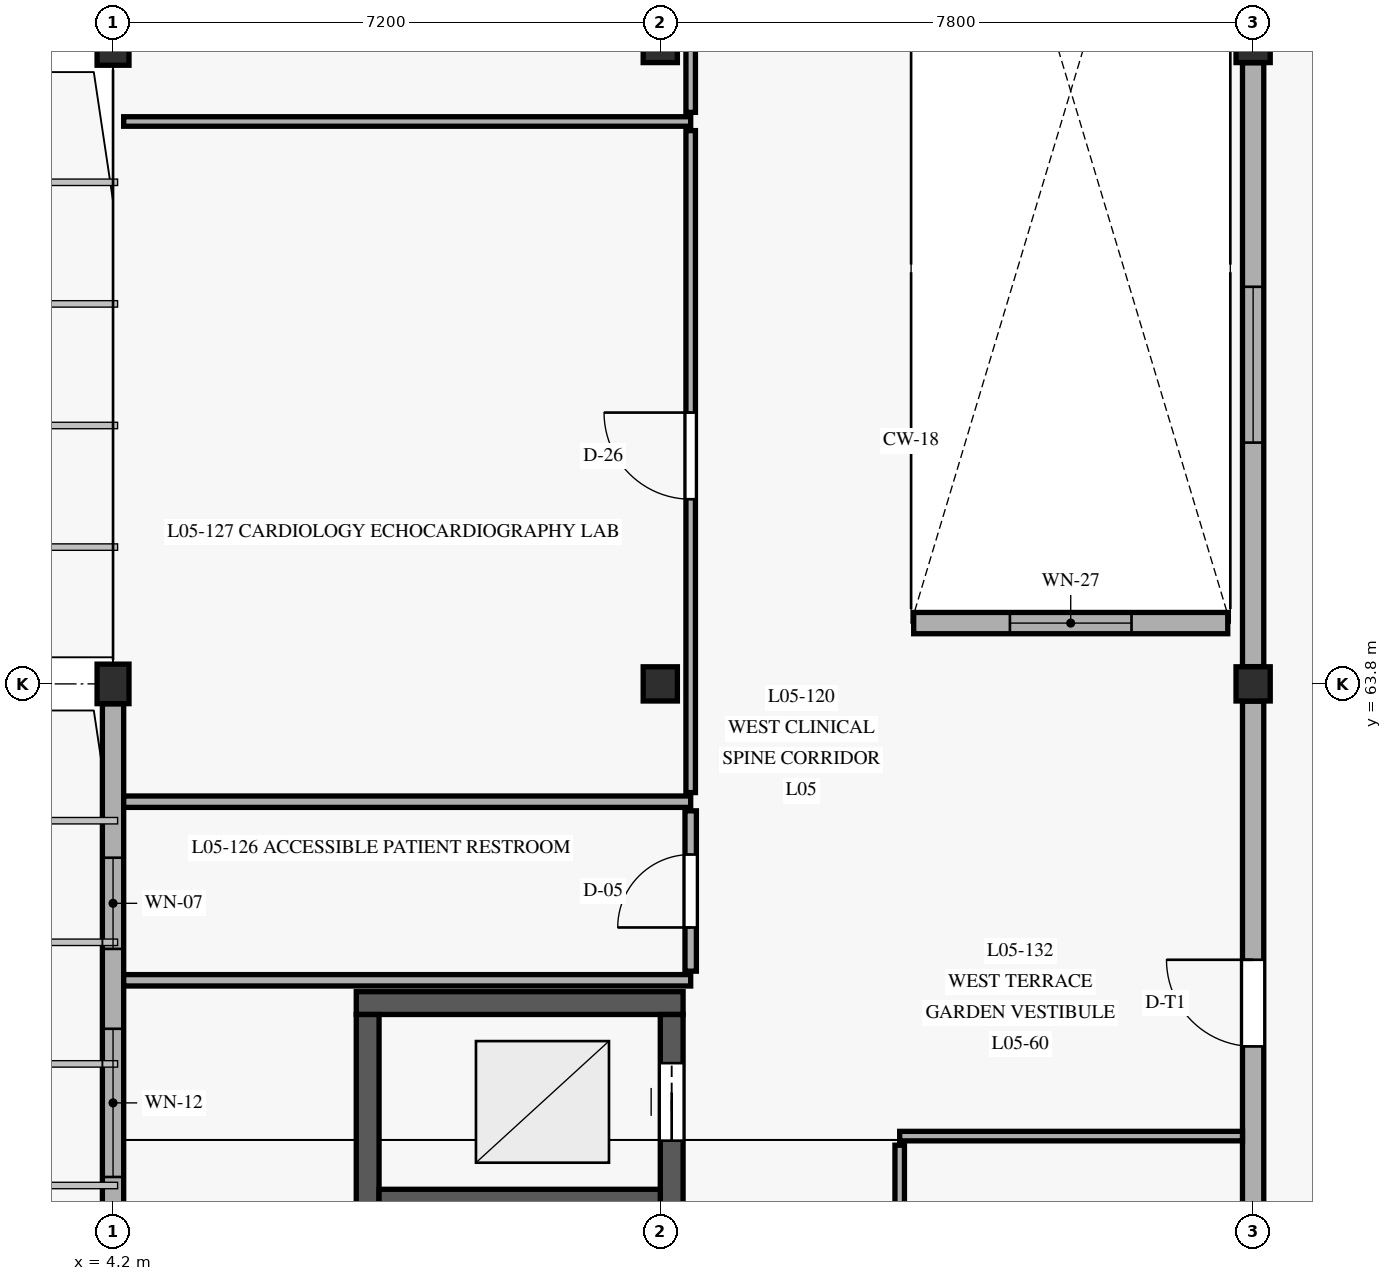
"""IFC4 building model, lengths in metres.
Left out: names, types, materials, properties, quantities, classifications, styles, units other than length and angle.
Written with IfcOpenShell. Run it as: python <this file> out.ifc"""

import sys

from ifc_helpers import new_model, si_unit, direction, frame, frame_2d, origin, origin_with_axes, origin_2d, place, context, subcontext, project, spatial, rectangle, extrude, element, fill, save


model = new_model("IFC4")
c1 = context("Model", 3, precision=1e-05, world=origin(), true_north=direction((0.0, 1.0)))
c2 = subcontext(c1, "Body", "Model", "MODEL_VIEW")
j1 = project(units=[si_unit("LENGTHUNIT", "METRE"), si_unit("PLANEANGLEUNIT", "RADIAN")], contexts=[c1])
p1 = place(None, origin())
s1 = spatial("IfcSite", under=j1, at=p1, CompositionType="ELEMENT")
p2 = place(p1, origin())
s2 = spatial("IfcBuilding", under=s1, at=p2, CompositionType="ELEMENT")
p3 = place(p2, frame((0.0, 0.0, 17.55)))
s3 = spatial("IfcBuildingStorey", under=s2, at=p3, CompositionType="ELEMENT", Elevation=17.55)
for number, where, z_axis, x_axis in (
    (1, (4.2, 63.8, 0.0), (0.0, 0.0, 1.0), (1.0, 0.0, 0.0)),
    (2, (4.2, 72.2, 0.0), (0.0, 0.0, 1.0), (1.0, 0.0, 0.0)),
):
    element("IfcColumn", number, at=place(p3, frame(where, z_axis=z_axis, x_axis=x_axis)), inside=s3, PredefinedType="COLUMN", context=c2, shape_type="SweptSolid", body=[
        extrude(rectangle(XDim=0.42, YDim=0.52, at=origin_2d()), origin(), (0.0, 0.0, 1.0), 4.05),
    ])
for number, where, z_axis, x_axis in (
    (3, (11.4, 63.8, 0.0), (0.0, 0.0, 1.0), (1.0, 0.0, 0.0)),
    (4, (11.4, 72.2, 0.0), (0.0, 0.0, 1.0), (1.0, 0.0, 0.0)),
    (5, (19.2, 63.8, 0.0), (0.0, 0.0, 1.0), (1.0, 0.0, 0.0)),
    (6, (19.2, 72.2, 0.0), (0.0, 0.0, 1.0), (1.0, 0.0, 0.0)),
):
    element("IfcColumn", number, at=place(p3, frame(where, z_axis=z_axis, x_axis=x_axis)), inside=s3, PredefinedType="COLUMN", context=c2, shape_type="SweptSolid", body=[
        extrude(rectangle(XDim=0.45, YDim=0.45, at=origin_2d()), origin(), (0.0, 0.0, 1.0), 4.05),
    ])
p4 = place(p3, frame((11.7, 59.6, 0.0), z_axis=(0.0, 0.0, 1.0), x_axis=(-1.0, 0.0, 0.0)))
e7 = element("IfcWall", 7, at=p4, inside=s3, PredefinedType="SHEAR", context=c2, shape_type="SweptSolid", body=[
    extrude(rectangle(XDim=4.3, YDim=0.3, at=frame_2d((2.15, 0.0))), origin(), (0.0, 0.0, 1.0), 3.77),
])
p5 = place(p3, frame((7.55, 59.45, 0.0), z_axis=(0.0, 0.0, 1.0), x_axis=(0.0, -1.0, 0.0)))
e8 = element("IfcWall", 8, at=p5, inside=s3, PredefinedType="SHEAR", context=c2, shape_type="SweptSolid", body=[
    extrude(rectangle(XDim=9.5, YDim=0.3, at=frame_2d((4.75, 0.0))), origin(), (0.0, 0.0, 1.0), 3.77),
])
p6 = place(p3, frame((11.55, 49.95, 0.0), z_axis=(0.0, 0.0, 1.0), x_axis=(0.0, 1.0, 0.0)))
e9 = element("IfcWall", 9, at=p6, inside=s3, PredefinedType="SHEAR", context=c2, shape_type="SweptSolid", body=[
    extrude(rectangle(XDim=9.5, YDim=0.3, at=frame_2d((4.75, 0.0))), origin(), (0.0, 0.0, 1.0), 3.77),
])
p7 = place(p6, frame((0.2, 0.0, 0.0)))
e10 = element("IfcOpeningElement", 10, at=p7, cuts=e9, PredefinedType="OPENING", context=c2, shape_type="SweptSolid", body=[
    extrude(rectangle(XDim=1.1, YDim=2.2, at=frame_2d((0.55, 1.1))), frame((0.0, 0.16, 0.0), z_axis=(0.0, -1.0, 0.0), x_axis=(1.0, 0.0, 0.0)), (0.0, 0.0, 1.0), 0.32),
])
p8 = place(p6, frame((7.84, 0.0, 0.0)))
e11 = element("IfcOpeningElement", 11, at=p8, cuts=e9, PredefinedType="OPENING", context=c2, shape_type="SweptSolid", body=[
    extrude(rectangle(XDim=1.02, YDim=2.15, at=frame_2d((0.51, 1.075))), frame((0.0, 0.16, 0.0), z_axis=(0.0, -1.0, 0.0), x_axis=(1.0, 0.0, 0.0)), (0.0, 0.0, 1.0), 0.32),
])
p9 = place(p3, frame((7.7, 57.0, 0.0), z_axis=(0.0, 0.0, 1.0), x_axis=(1.0, 0.0, 0.0)))
e12 = element("IfcWall", 12, at=p9, inside=s3, PredefinedType="SHEAR", context=c2, shape_type="SweptSolid", body=[
    extrude(rectangle(XDim=3.7, YDim=0.3, at=frame_2d((1.85, 0.0))), origin(), (0.0, 0.0, 1.0), 3.77),
])
p10 = place(p3, frame((4.2, 63.538, 0.0), z_axis=(0.0, 0.0, 1.0), x_axis=(0.0, -1.0, 0.0)))
e13 = element("IfcWall", 13, at=p10, inside=s3, PredefinedType="SOLIDWALL", context=c2, shape_type="SweptSolid", body=[
    extrude(rectangle(XDim=7.876, YDim=0.28, at=frame_2d((3.938, 0.0))), origin(), (0.0, 0.0, 1.0), 3.35),
])
p11 = place(p10, frame((2.025, 0.0, 0.88)))
e14 = element("IfcOpeningElement", 14, at=p11, cuts=e13, PredefinedType="OPENING", context=c2, shape_type="SweptSolid", body=[
    extrude(rectangle(XDim=1.2, YDim=1.85, at=frame_2d((0.6, 0.925))), frame((0.0, 0.15, 0.0), z_axis=(0.0, -1.0, 0.0), x_axis=(1.0, 0.0, 0.0)), (0.0, 0.0, 1.0), 0.3),
])
p12 = place(p10, frame((4.276, 0.0, 0.88)))
e15 = element("IfcOpeningElement", 15, at=p12, cuts=e13, PredefinedType="OPENING", context=c2, shape_type="SweptSolid", body=[
    extrude(rectangle(XDim=1.95, YDim=1.85, at=frame_2d((0.975, 0.925))), frame((0.0, 0.15, 0.0), z_axis=(0.0, -1.0, 0.0), x_axis=(1.0, 0.0, 0.0)), (0.0, 0.0, 1.0), 0.3),
])
p13 = place(p3, frame((19.2, 55.627, 0.0), z_axis=(0.0, 0.0, 1.0), x_axis=(0.0, 1.0, 0.0)))
e16 = element("IfcWall", 16, at=p13, inside=s3, PredefinedType="SOLIDWALL", context=c2, shape_type="SweptSolid", body=[
    extrude(rectangle(XDim=7.946, YDim=0.28, at=frame_2d((3.973, 0.0))), origin(), (0.0, 0.0, 1.0), 3.39),
])
p14 = place(p13, frame((3.403, 0.0, 0.0)))
e17 = element("IfcOpeningElement", 17, at=p14, cuts=e16, PredefinedType="OPENING", context=c2, shape_type="SweptSolid", body=[
    extrude(rectangle(XDim=1.14, YDim=2.3, at=frame_2d((0.57, 1.15))), frame((0.0, 0.15, 0.0), z_axis=(0.0, -1.0, 0.0), x_axis=(1.0, 0.0, 0.0)), (0.0, 0.0, 1.0), 0.3),
])
p15 = place(p3, frame((19.2, 64.027, 0.0), z_axis=(0.0, 0.0, 1.0), x_axis=(0.0, 1.0, 0.0)))
e18 = element("IfcWall", 18, at=p15, inside=s3, PredefinedType="SOLIDWALL", context=c2, shape_type="SweptSolid", body=[
    extrude(rectangle(XDim=7.946, YDim=0.28, at=frame_2d((3.973, 0.0))), origin(), (0.0, 0.0, 1.0), 3.39),
])
p16 = place(p15, frame((2.948, 0.0, 0.8)))
e19 = element("IfcOpeningElement", 19, at=p16, cuts=e18, PredefinedType="OPENING", context=c2, shape_type="SweptSolid", body=[
    extrude(rectangle(XDim=2.05, YDim=1.95, at=frame_2d((1.025, 0.975))), frame((0.0, 0.15, 0.0), z_axis=(0.0, -1.0, 0.0), x_axis=(1.0, 0.0, 0.0)), (0.0, 0.0, 1.0), 0.3),
])
p17 = place(p3, frame((18.866, 64.6, 0.0), z_axis=(0.0, 0.0, 1.0), x_axis=(-1.0, 0.0, 0.0)))
e20 = element("IfcWall", 20, at=p17, inside=s3, PredefinedType="SOLIDWALL", context=c2, shape_type="SweptSolid", body=[
    extrude(rectangle(XDim=4.132, YDim=0.28, at=frame_2d((2.066, 0.0))), origin(), (0.0, 0.0, 1.0), 3.77),
])
p18 = place(p17, frame((1.266, 0.0, 0.85)))
e21 = element("IfcOpeningElement", 21, at=p18, cuts=e20, PredefinedType="OPENING", context=c2, shape_type="SweptSolid", body=[
    extrude(rectangle(XDim=1.6, YDim=1.8, at=frame_2d((0.8, 0.9))), frame((0.0, 0.15, 0.0), z_axis=(0.0, -1.0, 0.0), x_axis=(1.0, 0.0, 0.0)), (0.0, 0.0, 1.0), 0.3),
])
p19 = place(p3, frame((11.8, 60.02, 0.0), z_axis=(0.0, 0.0, 1.0), x_axis=(0.0, 1.0, 0.0)))
e22 = element("IfcWall", 22, at=p19, inside=s3, PredefinedType="PARTITIONING", context=c2, shape_type="SweptSolid", body=[
    extrude(rectangle(XDim=2.11, YDim=0.15, at=frame_2d((1.055, 0.0))), origin(), (0.0, 0.0, 1.0), 3.765),
])
p20 = place(p19, frame((0.575, 0.0, 0.0)))
e23 = element("IfcOpeningElement", 23, at=p20, cuts=e22, PredefinedType="OPENING", context=c2, shape_type="SweptSolid", body=[
    extrude(rectangle(XDim=0.96, YDim=2.1, at=frame_2d((0.48, 1.05))), frame((0.0, 0.085, 0.0), z_axis=(0.0, -1.0, 0.0), x_axis=(1.0, 0.0, 0.0)), (0.0, 0.0, 1.0), 0.17),
])
for number, where, z_axis, x_axis in (
    (24, (4.34, 62.25, 0.0), (0.0, 0.0, 1.0), (1.0, 0.0, 0.0)),
    (25, (4.34, 59.9, 0.0), (0.0, 0.0, 1.0), (1.0, 0.0, 0.0)),
):
    element("IfcWall", number, at=place(p3, frame(where, z_axis=z_axis, x_axis=x_axis)), inside=s3, PredefinedType="PARTITIONING", context=c2, shape_type="SweptSolid", body=[
        extrude(rectangle(XDim=7.46, YDim=0.15, at=frame_2d((3.73, 0.0))), origin(), (0.0, 0.0, 1.0), 3.345),
    ])
p21 = place(p3, frame((11.8, 62.37, 0.0), z_axis=(0.0, 0.0, 1.0), x_axis=(0.0, 1.0, 0.0)))
e26 = element("IfcWall", 26, at=p21, inside=s3, PredefinedType="PARTITIONING", context=c2, shape_type="SweptSolid", body=[
    extrude(rectangle(XDim=8.71, YDim=0.125, at=frame_2d((4.355, 0.0))), origin(), (0.0, 0.0, 1.0), 3.365),
])
p22 = place(p21, frame((3.86, 0.0, 0.0)))
e27 = element("IfcOpeningElement", 27, at=p22, cuts=e26, PredefinedType="OPENING", context=c2, shape_type="SweptSolid", body=[
    extrude(rectangle(XDim=1.14, YDim=2.22, at=frame_2d((0.57, 1.11))), frame((0.0, 0.073, 0.0), z_axis=(0.0, -1.0, 0.0), x_axis=(1.0, 0.0, 0.0)), (0.0, 0.0, 1.0), 0.145),
])
p23 = place(p3, frame((4.34, 71.2, 0.0), z_axis=(0.0, 0.0, 1.0), x_axis=(1.0, 0.0, 0.0)))
e28 = element("IfcWall", 28, at=p23, inside=s3, PredefinedType="PARTITIONING", context=c2, shape_type="SweptSolid", body=[
    extrude(rectangle(XDim=7.46, YDim=0.125, at=frame_2d((3.73, 0.0))), origin(), (0.0, 0.0, 1.0), 3.345),
])
p24 = place(p3, frame((11.8, 71.32, 0.0), z_axis=(0.0, 0.0, 1.0), x_axis=(0.0, 1.0, 0.0)))
e29 = element("IfcWall", 29, at=p24, inside=s3, PredefinedType="PARTITIONING", context=c2, shape_type="SweptSolid", body=[
    extrude(rectangle(XDim=6.97, YDim=0.125, at=frame_2d((3.485, 0.0))), origin(), (0.0, 0.0, 1.0), 3.765),
])
p25 = place(p24, frame((2.985, 0.0, 0.0)))
e30 = element("IfcOpeningElement", 30, at=p25, cuts=e29, PredefinedType="OPENING", context=c2, shape_type="SweptSolid", body=[
    extrude(rectangle(XDim=1.0, YDim=2.15, at=frame_2d((0.5, 1.075))), frame((0.0, 0.073, 0.0), z_axis=(0.0, -1.0, 0.0), x_axis=(1.0, 0.0, 0.0)), (0.0, 0.0, 1.0), 0.145),
])
p26 = place(p3, frame((14.55, 49.4, 0.0), z_axis=(0.0, 0.0, 1.0), x_axis=(0.0, 1.0, 0.0)))
e31 = element("IfcWall", 31, at=p26, inside=s3, PredefinedType="PARTITIONING", context=c2, shape_type="SweptSolid", body=[
    extrude(rectangle(XDim=8.33, YDim=0.125, at=frame_2d((4.165, 0.0))), origin(), (0.0, 0.0, 1.0), 3.365),
])
p27 = place(p26, frame((3.715, 0.0, 0.0)))
e32 = element("IfcOpeningElement", 32, at=p27, cuts=e31, PredefinedType="OPENING", context=c2, shape_type="SweptSolid", body=[
    extrude(rectangle(XDim=0.9, YDim=2.12, at=frame_2d((0.45, 1.06))), frame((0.0, 0.073, 0.0), z_axis=(0.0, -1.0, 0.0), x_axis=(1.0, 0.0, 0.0)), (0.0, 0.0, 1.0), 0.145),
])
p28 = place(p3, frame((14.55, 57.85, 0.0), z_axis=(0.0, 0.0, 1.0), x_axis=(1.0, 0.0, 0.0)))
e33 = element("IfcWall", 33, at=p28, inside=s3, PredefinedType="PARTITIONING", context=c2, shape_type="SweptSolid", body=[
    extrude(rectangle(XDim=4.51, YDim=0.125, at=frame_2d((2.255, 0.0))), origin(), (0.0, 0.0, 1.0), 3.385),
])
p29 = place(p8, origin_with_axes())
e34 = element("IfcDoor", 34, at=p29, inside=s3, OperationType="SLIDING_TO_LEFT", PredefinedType="DOOR", context=c2, shape_type="SweptSolid", body=[
    extrude(rectangle(XDim=1.02, YDim=2.15, at=frame_2d((0.51, 1.075))), frame((0.0, 0.025, 0.0), z_axis=(0.0, -1.0, 0.0), x_axis=(1.0, 0.0, 0.0)), (0.0, 0.0, 1.0), 0.05),
])
fill(e11, e34)
p30 = place(p11, origin_with_axes())
e35 = element("IfcWindow", 35, at=p30, inside=s3, PartitioningType="SINGLE_PANEL", PredefinedType="WINDOW", context=c2, shape_type="SweptSolid", body=[
    extrude(rectangle(XDim=1.2, YDim=1.85, at=frame_2d((0.6, 0.925))), frame((0.0, 0.03, 0.0), z_axis=(0.0, -1.0, 0.0), x_axis=(1.0, 0.0, 0.0)), (0.0, 0.0, 1.0), 0.06),
])
fill(e14, e35)
p31 = place(p12, origin_with_axes())
e36 = element("IfcWindow", 36, at=p31, inside=s3, PartitioningType="SINGLE_PANEL", PredefinedType="WINDOW", context=c2, shape_type="SweptSolid", body=[
    extrude(rectangle(XDim=1.95, YDim=1.85, at=frame_2d((0.975, 0.925))), frame((0.0, 0.03, 0.0), z_axis=(0.0, -1.0, 0.0), x_axis=(1.0, 0.0, 0.0)), (0.0, 0.0, 1.0), 0.06),
])
fill(e15, e36)
p32 = place(p14, frame((1.14, 0.0, 0.0), z_axis=(0.0, 0.0, 1.0), x_axis=(-1.0, 0.0, 0.0)))
e37 = element("IfcDoor", 37, at=p32, inside=s3, OperationType="SINGLE_SWING_LEFT", PredefinedType="DOOR", context=c2, shape_type="SweptSolid", body=[
    extrude(rectangle(XDim=1.14, YDim=2.3, at=frame_2d((0.57, 1.15))), frame((0.0, 0.025, 0.0), z_axis=(0.0, -1.0, 0.0), x_axis=(1.0, 0.0, 0.0)), (0.0, 0.0, 1.0), 0.05),
])
fill(e17, e37)
p33 = place(p16, origin_with_axes())
e38 = element("IfcWindow", 38, at=p33, inside=s3, PartitioningType="SINGLE_PANEL", PredefinedType="WINDOW", context=c2, shape_type="SweptSolid", body=[
    extrude(rectangle(XDim=2.05, YDim=1.95, at=frame_2d((1.025, 0.975))), frame((0.0, 0.03, 0.0), z_axis=(0.0, -1.0, 0.0), x_axis=(1.0, 0.0, 0.0)), (0.0, 0.0, 1.0), 0.06),
])
fill(e19, e38)
p34 = place(p18, origin_with_axes())
e39 = element("IfcWindow", 39, at=p34, inside=s3, PartitioningType="SINGLE_PANEL", PredefinedType="WINDOW", context=c2, shape_type="SweptSolid", body=[
    extrude(rectangle(XDim=1.6, YDim=1.8, at=frame_2d((0.8, 0.9))), frame((0.0, 0.03, 0.0), z_axis=(0.0, -1.0, 0.0), x_axis=(1.0, 0.0, 0.0)), (0.0, 0.0, 1.0), 0.06),
])
fill(e21, e39)
p35 = place(p20, origin_with_axes())
e40 = element("IfcDoor", 40, at=p35, inside=s3, OperationType="SINGLE_SWING_LEFT", PredefinedType="DOOR", context=c2, shape_type="SweptSolid", body=[
    extrude(rectangle(XDim=0.96, YDim=2.1, at=frame_2d((0.48, 1.05))), frame((0.0, 0.025, 0.0), z_axis=(0.0, -1.0, 0.0), x_axis=(1.0, 0.0, 0.0)), (0.0, 0.0, 1.0), 0.05),
])
fill(e23, e40)
p36 = place(p22, origin_with_axes())
e41 = element("IfcDoor", 41, at=p36, inside=s3, OperationType="SINGLE_SWING_RIGHT", PredefinedType="DOOR", context=c2, shape_type="SweptSolid", body=[
    extrude(rectangle(XDim=1.14, YDim=2.22, at=frame_2d((0.57, 1.11))), frame((0.0, 0.025, 0.0), z_axis=(0.0, -1.0, 0.0), x_axis=(1.0, 0.0, 0.0)), (0.0, 0.0, 1.0), 0.05),
])
fill(e27, e41)
save(model, sys.argv[1])
